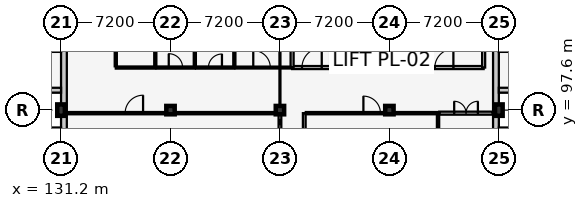
"""IFC4 building model, lengths in metres.
Left out: names, types, materials, properties, quantities, classifications, styles, units other than length and angle.
Written with IfcOpenShell. Run it as: python <this file> out.ifc"""

import sys

from ifc_helpers import new_model, si_unit, direction, frame, frame_2d, origin, origin_2d, place, context, subcontext, project, spatial, rectangle, extrude, element, fill, save


model = new_model("IFC4")
c1 = context("Model", 3, precision=1e-05, world=origin(), true_north=direction((0.0, 1.0)))
c2 = subcontext(c1, "Body", "Model", "MODEL_VIEW")
j1 = project(units=[si_unit("LENGTHUNIT", "METRE"), si_unit("PLANEANGLEUNIT", "RADIAN")], contexts=[c1])
p1 = place(None, origin())
s1 = spatial("IfcSite", under=j1, at=p1, CompositionType="ELEMENT")
p2 = place(p1, origin())
s2 = spatial("IfcBuilding", under=s1, at=p2, CompositionType="ELEMENT")
p3 = place(p2, frame((0.0, 0.0, 21.9)))
s3 = spatial("IfcBuildingStorey", under=s2, at=p3, CompositionType="ELEMENT", Elevation=21.9)
p4 = place(p3, frame((131.2, 97.6, 0.0), z_axis=(0.0, 0.0, 1.0), x_axis=(1.0, 0.0, 0.0)))
e1 = element("IfcColumn", 1, at=p4, inside=s3, PredefinedType="COLUMN", context=c2, shape_type="SweptSolid", body=[
    extrude(rectangle(XDim=0.5, YDim=0.75, at=origin_2d()), origin(), (0.0, 0.0, 1.0), 3.9),
])
for number, where, z_axis, x_axis in (
    (2, (138.4, 97.6, 0.0), (0.0, 0.0, 1.0), (1.0, 0.0, 0.0)),
    (3, (145.6, 97.6, 0.0), (0.0, 0.0, 1.0), (1.0, 0.0, 0.0)),
    (4, (152.8, 97.6, 0.0), (0.0, 0.0, 1.0), (1.0, 0.0, 0.0)),
):
    element("IfcColumn", number, at=place(p3, frame(where, z_axis=z_axis, x_axis=x_axis)), inside=s3, PredefinedType="COLUMN", context=c2, shape_type="SweptSolid", body=[
        extrude(rectangle(XDim=0.55, YDim=0.55, at=origin_2d()), origin(), (0.0, 0.0, 1.0), 3.9),
    ])
p5 = place(p3, frame((160.0, 97.6, 0.0), z_axis=(0.0, 0.0, 1.0), x_axis=(1.0, 0.0, 0.0)))
e5 = element("IfcColumn", 5, at=p5, inside=s3, PredefinedType="COLUMN", context=c2, shape_type="SweptSolid", body=[
    extrude(rectangle(XDim=0.5, YDim=0.75, at=origin_2d()), origin(), (0.0, 0.0, 1.0), 3.9),
])
p6 = place(p3, frame((159.81, 112.0, 0.0), z_axis=(0.0, 0.0, 1.0), x_axis=(0.0, -1.0, 0.0)))
e6 = element("IfcWall", 6, at=p6, inside=s3, PredefinedType="SOLIDWALL", context=c2, shape_type="SweptSolid", body=[
    extrude(rectangle(XDim=28.8, YDim=0.38, at=frame_2d((14.4, 0.0))), origin(), (0.0, 0.0, 1.0), 2.915),
])
for number, where, z_axis, x_axis in (
    (7, (160.0, 96.29, 0.0), (0.0, 0.0, 1.0), (1.0, 0.0, 0.0)),
    (8, (160.0, 98.91, 0.0), (0.0, 0.0, 1.0), (1.0, 0.0, 0.0)),
):
    element("IfcWall", number, at=place(p3, frame(where, z_axis=z_axis, x_axis=x_axis)), inside=s3, PredefinedType="SOLIDWALL", context=c2, shape_type="SweptSolid", body=[
        extrude(rectangle(XDim=1.35, YDim=0.32, at=frame_2d((0.675, 0.0))), origin(), (0.0, 0.0, 1.0), 3.64),
    ])
p7 = place(p3, frame((131.39, 83.2, 0.0), z_axis=(0.0, 0.0, 1.0), x_axis=(0.0, 1.0, 0.0)))
e9 = element("IfcWall", 9, at=p7, inside=s3, PredefinedType="SOLIDWALL", context=c2, shape_type="SweptSolid", body=[
    extrude(rectangle(XDim=28.8, YDim=0.38, at=frame_2d((14.4, 0.0))), origin(), (0.0, 0.0, 1.0), 2.915),
])
for number, where, z_axis, x_axis in (
    (10, (131.2, 96.29, 0.0), (0.0, 0.0, 1.0), (-1.0, 0.0, 0.0)),
    (11, (131.2, 98.91, 0.0), (0.0, 0.0, 1.0), (-1.0, 0.0, 0.0)),
):
    element("IfcWall", number, at=place(p3, frame(where, z_axis=z_axis, x_axis=x_axis)), inside=s3, PredefinedType="SOLIDWALL", context=c2, shape_type="SweptSolid", body=[
        extrude(rectangle(XDim=1.793, YDim=0.32, at=frame_2d((0.896, 0.0))), origin(), (0.0, 0.0, 1.0), 3.64),
    ])
p8 = place(p3, frame((146.4, 100.4, 0.0), z_axis=(0.0, 0.0, 1.0), x_axis=(1.0, 0.0, 0.0)))
e12 = element("IfcWall", 12, at=p8, inside=s3, PredefinedType="PARTITIONING", context=c2, shape_type="SweptSolid", body=[
    extrude(rectangle(XDim=2.6, YDim=0.2, at=frame_2d((1.3, 0.0))), origin(), (0.0, 0.0, 1.0), 3.66),
])
p9 = place(p8, frame((0.65, 0.0, 0.0)))
e13 = element("IfcOpeningElement", 13, at=p9, cuts=e12, PredefinedType="OPENING", context=c2, shape_type="SweptSolid", body=[
    extrude(rectangle(XDim=1.3, YDim=2.2, at=frame_2d((0.65, 1.1))), frame((0.0, 0.112, 0.0), z_axis=(0.0, -1.0, 0.0), x_axis=(1.0, 0.0, 0.0)), (0.0, 0.0, 1.0), 0.224),
])
p10 = place(p3, frame((146.4, 106.2, 0.0), z_axis=(0.0, 0.0, 1.0), x_axis=(0.0, -1.0, 0.0)))
e14 = element("IfcWall", 14, at=p10, inside=s3, PredefinedType="PARTITIONING", context=c2, shape_type="SweptSolid", body=[
    extrude(rectangle(XDim=5.8, YDim=0.2, at=frame_2d((2.9, 0.0))), origin(), (0.0, 0.0, 1.0), 3.66),
])
p11 = place(p3, frame((149.0, 100.4, 0.0), z_axis=(0.0, 0.0, 1.0), x_axis=(0.0, 1.0, 0.0)))
e15 = element("IfcWall", 15, at=p11, inside=s3, PredefinedType="PARTITIONING", context=c2, shape_type="SweptSolid", body=[
    extrude(rectangle(XDim=5.8, YDim=0.2, at=frame_2d((2.9, 0.0))), origin(), (0.0, 0.0, 1.0), 3.335),
])
p12 = place(p3, frame((153.8, 100.4, 0.0), z_axis=(0.0, 0.0, 1.0), x_axis=(1.0, 0.0, 0.0)))
e16 = element("IfcWall", 16, at=p12, inside=s3, PredefinedType="PARTITIONING", context=c2, shape_type="SweptSolid", body=[
    extrude(rectangle(XDim=5.2, YDim=0.2, at=frame_2d((2.6, 0.0))), origin(), (0.0, 0.0, 1.0), 3.66),
])
p13 = place(p12, frame((1.99, 0.0, 0.0)))
e17 = element("IfcOpeningElement", 17, at=p13, cuts=e16, PredefinedType="OPENING", context=c2, shape_type="SweptSolid", body=[
    extrude(rectangle(XDim=1.22, YDim=2.2, at=frame_2d((0.61, 1.1))), frame((0.0, 0.112, 0.0), z_axis=(0.0, -1.0, 0.0), x_axis=(1.0, 0.0, 0.0)), (0.0, 0.0, 1.0), 0.224),
])
for number, where, z_axis, x_axis in (
    (18, (153.8, 106.2, 0.0), (0.0, 0.0, 1.0), (0.0, -1.0, 0.0)),
    (19, (159.0, 100.4, 0.0), (0.0, 0.0, 1.0), (0.0, 1.0, 0.0)),
):
    element("IfcWall", number, at=place(p3, frame(where, z_axis=z_axis, x_axis=x_axis)), inside=s3, PredefinedType="PARTITIONING", context=c2, shape_type="SweptSolid", body=[
        extrude(rectangle(XDim=5.8, YDim=0.2, at=frame_2d((2.9, 0.0))), origin(), (0.0, 0.0, 1.0), 3.66),
    ])
p14 = place(p3, frame((145.6, 90.4, 0.0), z_axis=(0.0, 0.0, 1.0), x_axis=(0.0, 1.0, 0.0)))
e20 = element("IfcWall", 20, at=p14, inside=s3, PredefinedType="PARTITIONING", context=c2, shape_type="SweptSolid", body=[
    extrude(rectangle(XDim=7.0, YDim=0.18, at=frame_2d((3.5, 0.0))), origin(), (0.0, 0.0, 1.0), 3.035),
])
p15 = place(p3, frame((147.2, 90.4, 0.0), z_axis=(0.0, 0.0, 1.0), x_axis=(0.0, 1.0, 0.0)))
e21 = element("IfcWall", 21, at=p15, inside=s3, PredefinedType="PARTITIONING", context=c2, shape_type="SweptSolid", body=[
    extrude(rectangle(XDim=7.0, YDim=0.18, at=frame_2d((3.5, 0.0))), origin(), (0.0, 0.0, 1.0), 3.66),
])
p16 = place(p3, frame((134.8, 100.4, 0.0), z_axis=(0.0, 0.0, 1.0), x_axis=(1.0, 0.0, 0.0)))
e22 = element("IfcWall", 22, at=p16, inside=s3, PredefinedType="PARTITIONING", context=c2, shape_type="SweptSolid", body=[
    extrude(rectangle(XDim=2.6, YDim=0.14, at=frame_2d((1.3, 0.0))), origin(), (0.0, 0.0, 1.0), 3.66),
])
p17 = place(p3, frame((134.8, 100.48, 0.0), z_axis=(0.0, 0.0, 1.0), x_axis=(0.0, 1.0, 0.0)))
e23 = element("IfcWall", 23, at=p17, inside=s3, PredefinedType="PARTITIONING", context=c2, shape_type="SweptSolid", body=[
    extrude(rectangle(XDim=4.86, YDim=0.14, at=frame_2d((2.43, 0.0))), origin(), (0.0, 0.0, 1.0), 3.275),
])
p18 = place(p17, frame((1.93, 0.0, 0.0)))
e24 = element("IfcOpeningElement", 24, at=p18, cuts=e23, PredefinedType="OPENING", context=c2, shape_type="SweptSolid", body=[
    extrude(rectangle(XDim=1.0, YDim=2.1, at=frame_2d((0.5, 1.05))), frame((0.0, 0.082, 0.0), z_axis=(0.0, -1.0, 0.0), x_axis=(1.0, 0.0, 0.0)), (0.0, 0.0, 1.0), 0.164),
])
p19 = place(p3, frame((137.4, 100.48, 0.0), z_axis=(0.0, 0.0, 1.0), x_axis=(0.0, 1.0, 0.0)))
e25 = element("IfcWall", 25, at=p19, inside=s3, PredefinedType="PARTITIONING", context=c2, shape_type="SweptSolid", body=[
    extrude(rectangle(XDim=4.86, YDim=0.14, at=frame_2d((2.43, 0.0))), origin(), (0.0, 0.0, 1.0), 3.66),
])
p20 = place(p3, frame((137.48, 100.4, 0.0), z_axis=(0.0, 0.0, 1.0), x_axis=(1.0, 0.0, 0.0)))
e26 = element("IfcWall", 26, at=p20, inside=s3, PredefinedType="PARTITIONING", context=c2, shape_type="SweptSolid", body=[
    extrude(rectangle(XDim=2.52, YDim=0.14, at=frame_2d((1.26, 0.0))), origin(), (0.0, 0.0, 1.0), 3.66),
])
p21 = place(p20, frame((0.805, 0.0, 0.0)))
e27 = element("IfcOpeningElement", 27, at=p21, cuts=e26, PredefinedType="OPENING", context=c2, shape_type="SweptSolid", body=[
    extrude(rectangle(XDim=0.91, YDim=2.06, at=frame_2d((0.455, 1.03))), frame((0.0, 0.082, 0.0), z_axis=(0.0, -1.0, 0.0), x_axis=(1.0, 0.0, 0.0)), (0.0, 0.0, 1.0), 0.164),
])
p22 = place(p3, frame((140.0, 100.48, 0.0), z_axis=(0.0, 0.0, 1.0), x_axis=(0.0, 1.0, 0.0)))
e28 = element("IfcWall", 28, at=p22, inside=s3, PredefinedType="PARTITIONING", context=c2, shape_type="SweptSolid", body=[
    extrude(rectangle(XDim=4.86, YDim=0.14, at=frame_2d((2.43, 0.0))), origin(), (0.0, 0.0, 1.0), 3.66),
])
p23 = place(p3, frame((140.08, 100.4, 0.0), z_axis=(0.0, 0.0, 1.0), x_axis=(1.0, 0.0, 0.0)))
e29 = element("IfcWall", 29, at=p23, inside=s3, PredefinedType="PARTITIONING", context=c2, shape_type="SweptSolid", body=[
    extrude(rectangle(XDim=2.52, YDim=0.14, at=frame_2d((1.26, 0.0))), origin(), (0.0, 0.0, 1.0), 3.66),
])
p24 = place(p23, frame((0.815, 0.0, 0.0)))
e30 = element("IfcOpeningElement", 30, at=p24, cuts=e29, PredefinedType="OPENING", context=c2, shape_type="SweptSolid", body=[
    extrude(rectangle(XDim=0.89, YDim=2.05, at=frame_2d((0.445, 1.025))), frame((0.0, 0.082, 0.0), z_axis=(0.0, -1.0, 0.0), x_axis=(1.0, 0.0, 0.0)), (0.0, 0.0, 1.0), 0.164),
])
p25 = place(p3, frame((142.6, 100.48, 0.0), z_axis=(0.0, 0.0, 1.0), x_axis=(0.0, 1.0, 0.0)))
e31 = element("IfcWall", 31, at=p25, inside=s3, PredefinedType="PARTITIONING", context=c2, shape_type="SweptSolid", body=[
    extrude(rectangle(XDim=4.86, YDim=0.14, at=frame_2d((2.43, 0.0))), origin(), (0.0, 0.0, 1.0), 3.66),
])
p26 = place(p3, frame((142.68, 100.4, 0.0), z_axis=(0.0, 0.0, 1.0), x_axis=(1.0, 0.0, 0.0)))
e32 = element("IfcWall", 32, at=p26, inside=s3, PredefinedType="PARTITIONING", context=c2, shape_type="SweptSolid", body=[
    extrude(rectangle(XDim=3.61, YDim=0.125, at=frame_2d((1.805, 0.0))), origin(), (0.0, 0.0, 1.0), 3.66),
])
p27 = place(p26, frame((1.165, 0.0, 0.0)))
e33 = element("IfcOpeningElement", 33, at=p27, cuts=e32, PredefinedType="OPENING", context=c2, shape_type="SweptSolid", body=[
    extrude(rectangle(XDim=1.12, YDim=2.15, at=frame_2d((0.56, 1.075))), frame((0.0, 0.074, 0.0), z_axis=(0.0, -1.0, 0.0), x_axis=(1.0, 0.0, 0.0)), (0.0, 0.0, 1.0), 0.149),
])
p28 = place(p3, frame((131.6, 97.4, 0.0), z_axis=(0.0, 0.0, 1.0), x_axis=(1.0, 0.0, 0.0)))
e34 = element("IfcWall", 34, at=p28, inside=s3, PredefinedType="PARTITIONING", context=c2, shape_type="SweptSolid", body=[
    extrude(rectangle(XDim=13.9, YDim=0.15, at=frame_2d((6.95, 0.0))), origin(), (0.0, 0.0, 1.0), 2.785),
])
p29 = place(p28, frame((3.816, 0.0, 0.0)))
e35 = element("IfcOpeningElement", 35, at=p29, cuts=e34, PredefinedType="OPENING", context=c2, shape_type="SweptSolid", body=[
    extrude(rectangle(XDim=1.18, YDim=2.2, at=frame_2d((0.59, 1.1))), frame((0.0, 0.087, 0.0), z_axis=(0.0, -1.0, 0.0), x_axis=(1.0, 0.0, 0.0)), (0.0, 0.0, 1.0), 0.174),
])
p30 = place(p3, frame((147.3, 97.4, 0.0), z_axis=(0.0, 0.0, 1.0), x_axis=(1.0, 0.0, 0.0)))
e36 = element("IfcWall", 36, at=p30, inside=s3, PredefinedType="PARTITIONING", context=c2, shape_type="SweptSolid", body=[
    extrude(rectangle(XDim=8.7, YDim=0.15, at=frame_2d((4.35, 0.0))), origin(), (0.0, 0.0, 1.0), 2.935),
])
p31 = place(p30, frame((3.79, 0.0, 0.0)))
e37 = element("IfcOpeningElement", 37, at=p31, cuts=e36, PredefinedType="OPENING", context=c2, shape_type="SweptSolid", body=[
    extrude(rectangle(XDim=1.12, YDim=2.15, at=frame_2d((0.56, 1.075))), frame((0.0, 0.087, 0.0), z_axis=(0.0, -1.0, 0.0), x_axis=(1.0, 0.0, 0.0)), (0.0, 0.0, 1.0), 0.174),
])
p32 = place(p3, frame((156.0, 88.71, 0.0), z_axis=(0.0, 0.0, 1.0), x_axis=(0.0, 1.0, 0.0)))
e38 = element("IfcWall", 38, at=p32, inside=s3, PredefinedType="PARTITIONING", context=c2, shape_type="SweptSolid", body=[
    extrude(rectangle(XDim=8.605, YDim=0.15, at=frame_2d((4.302, 0.0))), origin(), (0.0, 0.0, 1.0), 3.66),
])
p33 = place(p3, frame((156.085, 97.4, 0.0), z_axis=(0.0, 0.0, 1.0), x_axis=(1.0, 0.0, 0.0)))
e39 = element("IfcWall", 39, at=p33, inside=s3, PredefinedType="PARTITIONING", context=c2, shape_type="SweptSolid", body=[
    extrude(rectangle(XDim=3.515, YDim=0.2, at=frame_2d((1.758, 0.0))), origin(), (0.0, 0.0, 1.0), 2.935),
])
p34 = place(p33, frame((0.978, 0.0, 0.0)))
e40 = element("IfcOpeningElement", 40, at=p34, cuts=e39, PredefinedType="OPENING", context=c2, shape_type="SweptSolid", body=[
    extrude(rectangle(XDim=1.56, YDim=2.25, at=frame_2d((0.78, 1.125))), frame((0.0, 0.112, 0.0), z_axis=(0.0, -1.0, 0.0), x_axis=(1.0, 0.0, 0.0)), (0.0, 0.0, 1.0), 0.224),
])
p35 = place(p9, origin())
e41 = element("IfcDoor", 41, at=p35, inside=s3, OperationType="SINGLE_SWING_RIGHT", PredefinedType="DOOR", context=c2, shape_type="SweptSolid", body=[
    extrude(rectangle(XDim=1.3, YDim=2.2, at=frame_2d((0.65, 1.1))), frame((0.0, 0.025, 0.0), z_axis=(0.0, -1.0, 0.0), x_axis=(1.0, 0.0, 0.0)), (0.0, 0.0, 1.0), 0.05),
])
fill(e13, e41)
p36 = place(p13, origin())
e42 = element("IfcDoor", 42, at=p36, inside=s3, OperationType="SINGLE_SWING_RIGHT", PredefinedType="DOOR", context=c2, shape_type="SweptSolid", body=[
    extrude(rectangle(XDim=1.22, YDim=2.2, at=frame_2d((0.61, 1.1))), frame((0.0, 0.025, 0.0), z_axis=(0.0, -1.0, 0.0), x_axis=(1.0, 0.0, 0.0)), (0.0, 0.0, 1.0), 0.05),
])
fill(e17, e42)
p37 = place(p21, origin())
e43 = element("IfcDoor", 43, at=p37, inside=s3, OperationType="SINGLE_SWING_LEFT", PredefinedType="DOOR", context=c2, shape_type="SweptSolid", body=[
    extrude(rectangle(XDim=0.91, YDim=2.06, at=frame_2d((0.455, 1.03))), frame((0.0, 0.025, 0.0), z_axis=(0.0, -1.0, 0.0), x_axis=(1.0, 0.0, 0.0)), (0.0, 0.0, 1.0), 0.05),
])
fill(e27, e43)
p38 = place(p24, origin())
e44 = element("IfcDoor", 44, at=p38, inside=s3, OperationType="SINGLE_SWING_RIGHT", PredefinedType="DOOR", context=c2, shape_type="SweptSolid", body=[
    extrude(rectangle(XDim=0.89, YDim=2.05, at=frame_2d((0.445, 1.025))), frame((0.0, 0.025, 0.0), z_axis=(0.0, -1.0, 0.0), x_axis=(1.0, 0.0, 0.0)), (0.0, 0.0, 1.0), 0.05),
])
fill(e30, e44)
p39 = place(p27, origin())
e45 = element("IfcDoor", 45, at=p39, inside=s3, OperationType="SINGLE_SWING_LEFT", PredefinedType="DOOR", context=c2, shape_type="SweptSolid", body=[
    extrude(rectangle(XDim=1.12, YDim=2.15, at=frame_2d((0.56, 1.075))), frame((0.0, 0.025, 0.0), z_axis=(0.0, -1.0, 0.0), x_axis=(1.0, 0.0, 0.0)), (0.0, 0.0, 1.0), 0.05),
])
fill(e33, e45)
p40 = place(p29, origin())
e46 = element("IfcDoor", 46, at=p40, inside=s3, OperationType="SINGLE_SWING_RIGHT", PredefinedType="DOOR", context=c2, shape_type="SweptSolid", body=[
    extrude(rectangle(XDim=1.18, YDim=2.2, at=frame_2d((0.59, 1.1))), frame((0.0, 0.025, 0.0), z_axis=(0.0, -1.0, 0.0), x_axis=(1.0, 0.0, 0.0)), (0.0, 0.0, 1.0), 0.05),
])
fill(e35, e46)
p41 = place(p31, origin())
e47 = element("IfcDoor", 47, at=p41, inside=s3, OperationType="SINGLE_SWING_LEFT", PredefinedType="DOOR", context=c2, shape_type="SweptSolid", body=[
    extrude(rectangle(XDim=1.12, YDim=2.15, at=frame_2d((0.56, 1.075))), frame((0.0, 0.025, 0.0), z_axis=(0.0, -1.0, 0.0), x_axis=(1.0, 0.0, 0.0)), (0.0, 0.0, 1.0), 0.05),
])
fill(e37, e47)
p42 = place(p34, origin())
e48 = element("IfcDoor", 48, at=p42, inside=s3, OperationType="DOUBLE_DOOR_SINGLE_SWING", PredefinedType="DOOR", context=c2, shape_type="SweptSolid", body=[
    extrude(rectangle(XDim=1.56, YDim=2.25, at=frame_2d((0.78, 1.125))), frame((0.0, 0.025, 0.0), z_axis=(0.0, -1.0, 0.0), x_axis=(1.0, 0.0, 0.0)), (0.0, 0.0, 1.0), 0.05),
])
fill(e40, e48)
save(model, sys.argv[1])
